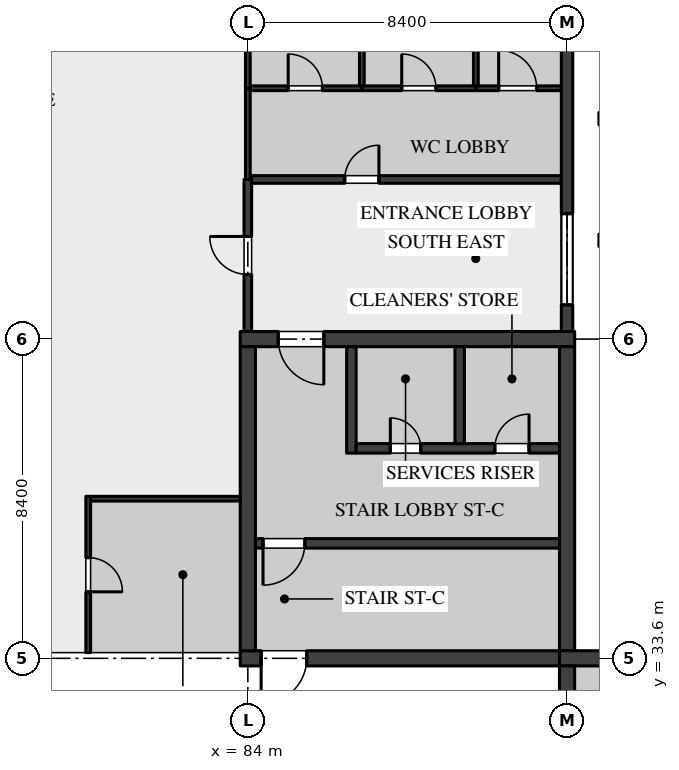
"""IFC4 building model, lengths in metres.
Left out: names, types, materials, properties, quantities, classifications, styles, units other than length and angle.
Written with IfcOpenShell. Run it as: python <this file> out.ifc"""

import sys

from ifc_helpers import new_model, si_unit, direction, frame, frame_2d, origin, origin_2d, place, context, subcontext, project, spatial, rectangle, hollow_circle, extrude, element, fill, save


model = new_model("IFC4")
c1 = context("Model", 3, precision=1e-05, world=origin(), true_north=direction((0.0, 1.0)))
c2 = subcontext(c1, "Body", "Model", "MODEL_VIEW")
j1 = project(units=[si_unit("LENGTHUNIT", "METRE"), si_unit("PLANEANGLEUNIT", "RADIAN")], contexts=[c1])
p1 = place(None, origin())
s1 = spatial("IfcSite", under=j1, at=p1, CompositionType="ELEMENT")
p2 = place(p1, origin())
s2 = spatial("IfcBuilding", under=s1, at=p2, CompositionType="ELEMENT")
p3 = place(p2, origin())
s3 = spatial("IfcBuildingStorey", under=s2, at=p3, CompositionType="ELEMENT", Elevation=0.0)
for number, where, z_axis, x_axis in (
    (1, (93.4, 44.6, 0.0), (0.0, 0.0, 1.0), (1.0, 0.0, 0.0)),
    (2, (93.4, 47.8, 0.0), (0.0, 0.0, 1.0), (1.0, 0.0, 0.0)),
):
    element("IfcColumn", number, at=place(p3, frame(where, z_axis=z_axis, x_axis=x_axis)), inside=s3, PredefinedType="COLUMN", context=c2, shape_type="SweptSolid", body=[
        extrude(hollow_circle(Radius=0.162, WallThickness=0.013, at=origin_2d()), origin(), (0.0, 0.0, 1.0), 4.495),
    ])
p4 = place(p3, frame((83.8, 33.6, 0.0), z_axis=(0.0, 0.0, 1.0), x_axis=(1.0, 0.0, 0.0)))
e3 = element("IfcWall", 3, at=p4, inside=s3, PredefinedType="SHEAR", context=c2, shape_type="SweptSolid", body=[
    extrude(rectangle(XDim=8.8, YDim=0.4, at=frame_2d((4.4, 0.0))), origin(), (0.0, 0.0, 1.0), 5.05),
])
p5 = place(p4, frame((0.55, 0.0, 0.0)))
e4 = element("IfcOpeningElement", 4, at=p5, cuts=e3, PredefinedType="OPENING", context=c2, shape_type="SweptSolid", body=[
    extrude(rectangle(XDim=1.2, YDim=2.1, at=frame_2d((0.6, 1.05))), frame((0.0, 0.21, 0.0), z_axis=(0.0, -1.0, 0.0), x_axis=(1.0, 0.0, 0.0)), (0.0, 0.0, 1.0), 0.42),
])
p6 = place(p3, frame((83.8, 42.0, 0.0), z_axis=(0.0, 0.0, 1.0), x_axis=(1.0, 0.0, 0.0)))
e5 = element("IfcWall", 5, at=p6, inside=s3, PredefinedType="SHEAR", context=c2, shape_type="SweptSolid", body=[
    extrude(rectangle(XDim=8.8, YDim=0.4, at=frame_2d((4.4, 0.0))), origin(), (0.0, 0.0, 1.0), 5.05),
])
p7 = place(p6, frame((1.0, 0.0, 0.0)))
e6 = element("IfcOpeningElement", 6, at=p7, cuts=e5, PredefinedType="OPENING", context=c2, shape_type="SweptSolid", body=[
    extrude(rectangle(XDim=1.2, YDim=2.1, at=frame_2d((0.6, 1.05))), frame((0.0, 0.21, 0.0), z_axis=(0.0, -1.0, 0.0), x_axis=(1.0, 0.0, 0.0)), (0.0, 0.0, 1.0), 0.42),
])
for number, where, z_axis, x_axis in (
    (7, (84.0, 33.8, 0.0), (0.0, 0.0, 1.0), (0.0, 1.0, 0.0)),
    (8, (92.4, 33.8, 0.0), (0.0, 0.0, 1.0), (0.0, 1.0, 0.0)),
):
    element("IfcWall", number, at=place(p3, frame(where, z_axis=z_axis, x_axis=x_axis)), inside=s3, PredefinedType="SHEAR", context=c2, shape_type="SweptSolid", body=[
        extrude(rectangle(XDim=8.0, YDim=0.4, at=frame_2d((4.0, 0.0))), origin(), (0.0, 0.0, 1.0), 5.05),
    ])
p8 = place(p3, frame((84.2, 36.625, 0.0), z_axis=(0.0, 0.0, 1.0), x_axis=(1.0, 0.0, 0.0)))
e9 = element("IfcWall", 9, at=p8, inside=s3, PredefinedType="SOLIDWALL", context=c2, shape_type="SweptSolid", body=[
    extrude(rectangle(XDim=8.0, YDim=0.25, at=frame_2d((4.0, 0.0))), origin(), (0.0, 0.0, 1.0), 5.05),
])
p9 = place(p8, frame((0.2, 0.0, 0.0)))
e10 = element("IfcOpeningElement", 10, at=p9, cuts=e9, PredefinedType="OPENING", context=c2, shape_type="SweptSolid", body=[
    extrude(rectangle(XDim=1.1, YDim=2.1, at=frame_2d((0.55, 1.05))), frame((0.0, 0.135, 0.0), z_axis=(0.0, -1.0, 0.0), x_axis=(1.0, 0.0, 0.0)), (0.0, 0.0, 1.0), 0.27),
])
p10 = place(p3, frame((86.725, 39.0, 0.0), z_axis=(0.0, 0.0, 1.0), x_axis=(0.0, 1.0, 0.0)))
e11 = element("IfcWall", 11, at=p10, inside=s3, PredefinedType="SOLIDWALL", context=c2, shape_type="SweptSolid", body=[
    extrude(rectangle(XDim=2.8, YDim=0.25, at=frame_2d((1.4, 0.0))), origin(), (0.0, 0.0, 1.0), 5.05),
])
p11 = place(p3, frame((86.85, 39.125, 0.0), z_axis=(0.0, 0.0, 1.0), x_axis=(1.0, 0.0, 0.0)))
e12 = element("IfcWall", 12, at=p11, inside=s3, PredefinedType="SOLIDWALL", context=c2, shape_type="SweptSolid", body=[
    extrude(rectangle(XDim=5.35, YDim=0.25, at=frame_2d((2.675, 0.0))), origin(), (0.0, 0.0, 1.0), 5.05),
])
p12 = place(p11, frame((3.65, 0.0, 0.0)))
e13 = element("IfcOpeningElement", 13, at=p12, cuts=e12, PredefinedType="OPENING", context=c2, shape_type="SweptSolid", body=[
    extrude(rectangle(XDim=0.9, YDim=2.1, at=frame_2d((0.45, 1.05))), frame((0.0, 0.135, 0.0), z_axis=(0.0, -1.0, 0.0), x_axis=(1.0, 0.0, 0.0)), (0.0, 0.0, 1.0), 0.27),
])
p13 = place(p11, frame((0.9, 0.0, 0.0)))
e14 = element("IfcOpeningElement", 14, at=p13, cuts=e12, PredefinedType="OPENING", context=c2, shape_type="SweptSolid", body=[
    extrude(rectangle(XDim=0.8, YDim=2.1, at=frame_2d((0.4, 1.05))), frame((0.0, 0.135, 0.0), z_axis=(0.0, -1.0, 0.0), x_axis=(1.0, 0.0, 0.0)), (0.0, 0.0, 1.0), 0.27),
])
p14 = place(p3, frame((89.575, 39.25, 0.0), z_axis=(0.0, 0.0, 1.0), x_axis=(0.0, 1.0, 0.0)))
e15 = element("IfcWall", 15, at=p14, inside=s3, PredefinedType="SOLIDWALL", context=c2, shape_type="SweptSolid", body=[
    extrude(rectangle(XDim=2.55, YDim=0.25, at=frame_2d((1.275, 0.0))), origin(), (0.0, 0.0, 1.0), 5.05),
])
p15 = place(p3, frame((92.2, 33.6, 0.0), z_axis=(0.0, 0.0, 1.0), x_axis=(1.0, 0.0, 0.0)))
e16 = element("IfcWall", 16, at=p15, inside=s3, PredefinedType="SHEAR", context=c2, shape_type="SweptSolid", body=[
    extrude(rectangle(XDim=8.8, YDim=0.4, at=frame_2d((4.4, 0.0))), origin(), (0.0, 0.0, 1.0), 5.05),
])
p16 = place(p15, frame((7.05, 0.0, 0.0)))
e17 = element("IfcOpeningElement", 17, at=p16, cuts=e16, PredefinedType="OPENING", context=c2, shape_type="SweptSolid", body=[
    extrude(rectangle(XDim=1.2, YDim=2.1, at=frame_2d((0.6, 1.05))), frame((0.0, 0.21, 0.0), z_axis=(0.0, -1.0, 0.0), x_axis=(1.0, 0.0, 0.0)), (0.0, 0.0, 1.0), 0.42),
])
p17 = place(p3, frame((92.4, 25.4, 0.0), z_axis=(0.0, 0.0, 1.0), x_axis=(0.0, 1.0, 0.0)))
e18 = element("IfcWall", 18, at=p17, inside=s3, PredefinedType="SHEAR", context=c2, shape_type="SweptSolid", body=[
    extrude(rectangle(XDim=8.0, YDim=0.4, at=frame_2d((4.0, 0.0))), origin(), (0.0, 0.0, 1.0), 5.05),
])
p18 = place(p3, frame((79.8, 33.75, 0.0), z_axis=(0.0, 0.0, 1.0), x_axis=(0.0, 1.0, 0.0)))
e19 = element("IfcWall", 19, at=p18, inside=s3, PredefinedType="PARTITIONING", context=c2, shape_type="SweptSolid", body=[
    extrude(rectangle(XDim=4.112, YDim=0.125, at=frame_2d((2.056, 0.0))), origin(), (0.0, 0.0, 1.0), 18.77),
])
p19 = place(p18, frame((1.6, 0.0, 0.0)))
e20 = element("IfcOpeningElement", 20, at=p19, cuts=e19, PredefinedType="OPENING", context=c2, shape_type="SweptSolid", body=[
    extrude(rectangle(XDim=0.9, YDim=2.1, at=frame_2d((0.45, 1.05))), frame((0.0, 0.073, 0.0), z_axis=(0.0, -1.0, 0.0), x_axis=(1.0, 0.0, 0.0)), (0.0, 0.0, 1.0), 0.145),
])
p20 = place(p3, frame((79.862, 37.8, 0.0), z_axis=(0.0, 0.0, 1.0), x_axis=(1.0, 0.0, 0.0)))
e21 = element("IfcWall", 21, at=p20, inside=s3, PredefinedType="PARTITIONING", context=c2, shape_type="SweptSolid", body=[
    extrude(rectangle(XDim=3.938, YDim=0.125, at=frame_2d((1.969, 0.0))), origin(), (0.0, 0.0, 1.0), 18.77),
])
p21 = place(p3, frame((84.0, 42.2, 0.0), z_axis=(0.0, 0.0, 1.0), x_axis=(0.0, 1.0, 0.0)))
e22 = element("IfcWall", 22, at=p21, inside=s3, PredefinedType="PARTITIONING", context=c2, shape_type="SweptSolid", body=[
    extrude(rectangle(XDim=4.0, YDim=0.2, at=frame_2d((2.0, 0.0))), origin(), (0.0, 0.0, 1.0), 18.77),
])
p22 = place(p21, frame((1.5, 0.0, 0.0)))
e23 = element("IfcOpeningElement", 23, at=p22, cuts=e22, PredefinedType="OPENING", context=c2, shape_type="SweptSolid", body=[
    extrude(rectangle(XDim=1.0, YDim=2.4, at=frame_2d((0.5, 1.2))), frame((0.0, 0.11, 0.0), z_axis=(0.0, -1.0, 0.0), x_axis=(1.0, 0.0, 0.0)), (0.0, 0.0, 1.0), 0.22),
])
p23 = place(p3, frame((84.1, 46.2, 0.0), z_axis=(0.0, 0.0, 1.0), x_axis=(1.0, 0.0, 0.0)))
e24 = element("IfcWall", 24, at=p23, inside=s3, PredefinedType="PARTITIONING", context=c2, shape_type="SweptSolid", body=[
    extrude(rectangle(XDim=8.15, YDim=0.2, at=frame_2d((4.075, 0.0))), origin(), (0.0, 0.0, 1.0), 5.05),
])
p24 = place(p23, frame((2.45, 0.0, 0.0)))
e25 = element("IfcOpeningElement", 25, at=p24, cuts=e24, PredefinedType="OPENING", context=c2, shape_type="SweptSolid", body=[
    extrude(rectangle(XDim=0.9, YDim=2.1, at=frame_2d((0.45, 1.05))), frame((0.0, 0.11, 0.0), z_axis=(0.0, -1.0, 0.0), x_axis=(1.0, 0.0, 0.0)), (0.0, 0.0, 1.0), 0.22),
])
p25 = place(p3, frame((84.0, 46.2, 0.0), z_axis=(0.0, 0.0, 1.0), x_axis=(0.0, 1.0, 0.0)))
e26 = element("IfcWall", 26, at=p25, inside=s3, PredefinedType="PARTITIONING", context=c2, shape_type="SweptSolid", body=[
    extrude(rectangle(XDim=2.4, YDim=0.125, at=frame_2d((1.2, 0.0))), origin(), (0.0, 0.0, 1.0), 18.77),
])
p26 = place(p3, frame((84.0, 48.6, 0.0), z_axis=(0.0, 0.0, 1.0), x_axis=(0.0, 1.0, 0.0)))
e27 = element("IfcWall", 27, at=p26, inside=s3, PredefinedType="PARTITIONING", context=c2, shape_type="SweptSolid", body=[
    extrude(rectangle(XDim=1.35, YDim=0.125, at=frame_2d((0.675, 0.0))), origin(), (0.0, 0.0, 1.0), 18.77),
])
p27 = place(p3, frame((90.0, 48.663, 0.0), z_axis=(0.0, 0.0, 1.0), x_axis=(0.0, 1.0, 0.0)))
e28 = element("IfcWall", 28, at=p27, inside=s3, PredefinedType="PARTITIONING", context=c2, shape_type="SweptSolid", body=[
    extrude(rectangle(XDim=5.837, YDim=0.125, at=frame_2d((2.918, 0.0))), origin(), (0.0, 0.0, 1.0), 5.05),
])
p28 = place(p3, frame((90.0, 48.6, 0.0), z_axis=(0.0, 0.0, 1.0), x_axis=(1.0, 0.0, 0.0)))
e29 = element("IfcWall", 29, at=p28, inside=s3, PredefinedType="PARTITIONING", context=c2, shape_type="SweptSolid", body=[
    extrude(rectangle(XDim=2.25, YDim=0.125, at=frame_2d((1.125, 0.0))), origin(), (0.0, 0.0, 1.0), 5.05),
])
p29 = place(p28, frame((0.6, 0.0, 0.0)))
e30 = element("IfcOpeningElement", 30, at=p29, cuts=e29, PredefinedType="OPENING", context=c2, shape_type="SweptSolid", body=[
    extrude(rectangle(XDim=1.0, YDim=2.1, at=frame_2d((0.5, 1.05))), frame((0.0, 0.073, 0.0), z_axis=(0.0, -1.0, 0.0), x_axis=(1.0, 0.0, 0.0)), (0.0, 0.0, 1.0), 0.145),
])
p30 = place(p3, frame((87.0, 48.6, 0.0), z_axis=(0.0, 0.0, 1.0), x_axis=(1.0, 0.0, 0.0)))
e31 = element("IfcWall", 31, at=p30, inside=s3, PredefinedType="PARTITIONING", context=c2, shape_type="SweptSolid", body=[
    extrude(rectangle(XDim=3.0, YDim=0.125, at=frame_2d((1.5, 0.0))), origin(), (0.0, 0.0, 1.0), 5.05),
])
p31 = place(p30, frame((1.05, 0.0, 0.0)))
e32 = element("IfcOpeningElement", 32, at=p31, cuts=e31, PredefinedType="OPENING", context=c2, shape_type="SweptSolid", body=[
    extrude(rectangle(XDim=0.9, YDim=2.1, at=frame_2d((0.45, 1.05))), frame((0.0, 0.073, 0.0), z_axis=(0.0, -1.0, 0.0), x_axis=(1.0, 0.0, 0.0)), (0.0, 0.0, 1.0), 0.145),
])
p32 = place(p3, frame((87.0, 48.663, 0.0), z_axis=(0.0, 0.0, 1.0), x_axis=(0.0, 1.0, 0.0)))
e33 = element("IfcWall", 33, at=p32, inside=s3, PredefinedType="PARTITIONING", context=c2, shape_type="SweptSolid", body=[
    extrude(rectangle(XDim=5.837, YDim=0.125, at=frame_2d((2.918, 0.0))), origin(), (0.0, 0.0, 1.0), 5.05),
])
p33 = place(p3, frame((84.062, 48.6, 0.0), z_axis=(0.0, 0.0, 1.0), x_axis=(1.0, 0.0, 0.0)))
e34 = element("IfcWall", 34, at=p33, inside=s3, PredefinedType="PARTITIONING", context=c2, shape_type="SweptSolid", body=[
    extrude(rectangle(XDim=2.938, YDim=0.125, at=frame_2d((1.469, 0.0))), origin(), (0.0, 0.0, 1.0), 5.05),
])
p34 = place(p33, frame((1.0, 0.0, 0.0)))
e35 = element("IfcOpeningElement", 35, at=p34, cuts=e34, PredefinedType="OPENING", context=c2, shape_type="SweptSolid", body=[
    extrude(rectangle(XDim=0.9, YDim=2.1, at=frame_2d((0.45, 1.05))), frame((0.0, 0.073, 0.0), z_axis=(0.0, -1.0, 0.0), x_axis=(1.0, 0.0, 0.0)), (0.0, 0.0, 1.0), 0.145),
])
p35 = place(p3, frame((92.4, 42.2, 0.0), z_axis=(0.0, 0.0, 1.0), x_axis=(0.0, 1.0, 0.0)))
e36 = element("IfcWall", 36, at=p35, inside=s3, PredefinedType="SOLIDWALL", context=c2, shape_type="SweptSolid", body=[
    extrude(rectangle(XDim=7.87, YDim=0.3, at=frame_2d((3.935, 0.0))), origin(), (0.0, 0.0, 1.0), 5.05),
])
p36 = place(p35, frame((0.7, 0.0, 2.25)))
e37 = element("IfcOpeningElement", 37, at=p36, cuts=e36, PredefinedType="OPENING", context=c2, shape_type="SweptSolid", body=[
    extrude(rectangle(XDim=2.4, YDim=1.8, at=frame_2d((1.2, 0.9))), frame((0.0, 0.16, 0.0), z_axis=(0.0, -1.0, 0.0), x_axis=(1.0, 0.0, 0.0)), (0.0, 0.0, 1.0), 0.32),
])
p37 = place(p12, origin())
e38 = element("IfcDoor", 38, at=p37, inside=s3, OperationType="SINGLE_SWING_LEFT", PredefinedType="DOOR", context=c2, shape_type="SweptSolid", body=[
    extrude(rectangle(XDim=0.9, YDim=2.1, at=frame_2d((0.45, 1.05))), frame((0.0, 0.035, 0.0), z_axis=(0.0, -1.0, 0.0), x_axis=(1.0, 0.0, 0.0)), (0.0, 0.0, 1.0), 0.07),
])
fill(e13, e38)
p38 = place(p7, frame((1.2, 0.0, 0.0), z_axis=(0.0, 0.0, 1.0), x_axis=(-1.0, 0.0, 0.0)))
e39 = element("IfcDoor", 39, at=p38, inside=s3, OperationType="SINGLE_SWING_RIGHT", PredefinedType="DOOR", context=c2, shape_type="SweptSolid", body=[
    extrude(rectangle(XDim=1.2, YDim=2.1, at=frame_2d((0.6, 1.05))), frame((0.0, 0.035, 0.0), z_axis=(0.0, -1.0, 0.0), x_axis=(1.0, 0.0, 0.0)), (0.0, 0.0, 1.0), 0.07),
])
fill(e6, e39)
p39 = place(p13, origin())
e40 = element("IfcDoor", 40, at=p39, inside=s3, OperationType="SINGLE_SWING_RIGHT", PredefinedType="DOOR", context=c2, shape_type="SweptSolid", body=[
    extrude(rectangle(XDim=0.8, YDim=2.1, at=frame_2d((0.4, 1.05))), frame((0.0, 0.035, 0.0), z_axis=(0.0, -1.0, 0.0), x_axis=(1.0, 0.0, 0.0)), (0.0, 0.0, 1.0), 0.07),
])
fill(e14, e40)
p40 = place(p9, frame((1.1, 0.0, 0.0), z_axis=(0.0, 0.0, 1.0), x_axis=(-1.0, 0.0, 0.0)))
e41 = element("IfcDoor", 41, at=p40, inside=s3, OperationType="SINGLE_SWING_LEFT", PredefinedType="DOOR", context=c2, shape_type="SweptSolid", body=[
    extrude(rectangle(XDim=1.1, YDim=2.1, at=frame_2d((0.55, 1.05))), frame((0.0, 0.035, 0.0), z_axis=(0.0, -1.0, 0.0), x_axis=(1.0, 0.0, 0.0)), (0.0, 0.0, 1.0), 0.07),
])
fill(e10, e41)
p41 = place(p5, frame((1.2, 0.0, 0.0), z_axis=(0.0, 0.0, 1.0), x_axis=(-1.0, 0.0, 0.0)))
e42 = element("IfcDoor", 42, at=p41, inside=s3, OperationType="SINGLE_SWING_LEFT", PredefinedType="DOOR", context=c2, shape_type="SweptSolid", body=[
    extrude(rectangle(XDim=1.2, YDim=2.1, at=frame_2d((0.6, 1.05))), frame((0.0, 0.035, 0.0), z_axis=(0.0, -1.0, 0.0), x_axis=(1.0, 0.0, 0.0)), (0.0, 0.0, 1.0), 0.07),
])
fill(e4, e42)
p42 = place(p19, frame((0.9, 0.0, 0.0), z_axis=(0.0, 0.0, 1.0), x_axis=(-1.0, 0.0, 0.0)))
e43 = element("IfcDoor", 43, at=p42, inside=s3, OperationType="SINGLE_SWING_LEFT", PredefinedType="DOOR", context=c2, shape_type="SweptSolid", body=[
    extrude(rectangle(XDim=0.9, YDim=2.1, at=frame_2d((0.45, 1.05))), frame((0.0, 0.02, 0.0), z_axis=(0.0, -1.0, 0.0), x_axis=(1.0, 0.0, 0.0)), (0.0, 0.0, 1.0), 0.04),
])
fill(e20, e43)
p43 = place(p22, origin())
e44 = element("IfcDoor", 44, at=p43, inside=s3, OperationType="SINGLE_SWING_LEFT", PredefinedType="DOOR", context=c2, shape_type="SweptSolid", body=[
    extrude(rectangle(XDim=1.0, YDim=2.4, at=frame_2d((0.5, 1.2))), frame((0.0, 0.03, 0.0), z_axis=(0.0, -1.0, 0.0), x_axis=(1.0, 0.0, 0.0)), (0.0, 0.0, 1.0), 0.06),
])
fill(e23, e44)
p44 = place(p29, origin())
e45 = element("IfcDoor", 45, at=p44, inside=s3, OperationType="SINGLE_SWING_RIGHT", PredefinedType="DOOR", context=c2, shape_type="SweptSolid", body=[
    extrude(rectangle(XDim=1.0, YDim=2.1, at=frame_2d((0.5, 1.05))), frame((0.0, 0.02, 0.0), z_axis=(0.0, -1.0, 0.0), x_axis=(1.0, 0.0, 0.0)), (0.0, 0.0, 1.0), 0.04),
])
fill(e30, e45)
p45 = place(p31, origin())
e46 = element("IfcDoor", 46, at=p45, inside=s3, OperationType="SINGLE_SWING_RIGHT", PredefinedType="DOOR", context=c2, shape_type="SweptSolid", body=[
    extrude(rectangle(XDim=0.9, YDim=2.1, at=frame_2d((0.45, 1.05))), frame((0.0, 0.02, 0.0), z_axis=(0.0, -1.0, 0.0), x_axis=(1.0, 0.0, 0.0)), (0.0, 0.0, 1.0), 0.04),
])
fill(e32, e46)
p46 = place(p24, origin())
e47 = element("IfcDoor", 47, at=p46, inside=s3, OperationType="SINGLE_SWING_LEFT", PredefinedType="DOOR", context=c2, shape_type="SweptSolid", body=[
    extrude(rectangle(XDim=0.9, YDim=2.1, at=frame_2d((0.45, 1.05))), frame((0.0, 0.03, 0.0), z_axis=(0.0, -1.0, 0.0), x_axis=(1.0, 0.0, 0.0)), (0.0, 0.0, 1.0), 0.06),
])
fill(e25, e47)
p47 = place(p34, origin())
e48 = element("IfcDoor", 48, at=p47, inside=s3, OperationType="SINGLE_SWING_RIGHT", PredefinedType="DOOR", context=c2, shape_type="SweptSolid", body=[
    extrude(rectangle(XDim=0.9, YDim=2.1, at=frame_2d((0.45, 1.05))), frame((0.0, 0.02, 0.0), z_axis=(0.0, -1.0, 0.0), x_axis=(1.0, 0.0, 0.0)), (0.0, 0.0, 1.0), 0.04),
])
fill(e35, e48)
p48 = place(p36, origin())
e49 = element("IfcWindow", 49, at=p48, inside=s3, PartitioningType="SINGLE_PANEL", PredefinedType="WINDOW", context=c2, shape_type="SweptSolid", body=[
    extrude(rectangle(XDim=2.4, YDim=1.8, at=frame_2d((1.2, 0.9))), frame((0.0, 0.05, 0.0), z_axis=(0.0, -1.0, 0.0), x_axis=(1.0, 0.0, 0.0)), (0.0, 0.0, 1.0), 0.1),
])
fill(e37, e49)
save(model, sys.argv[1])
